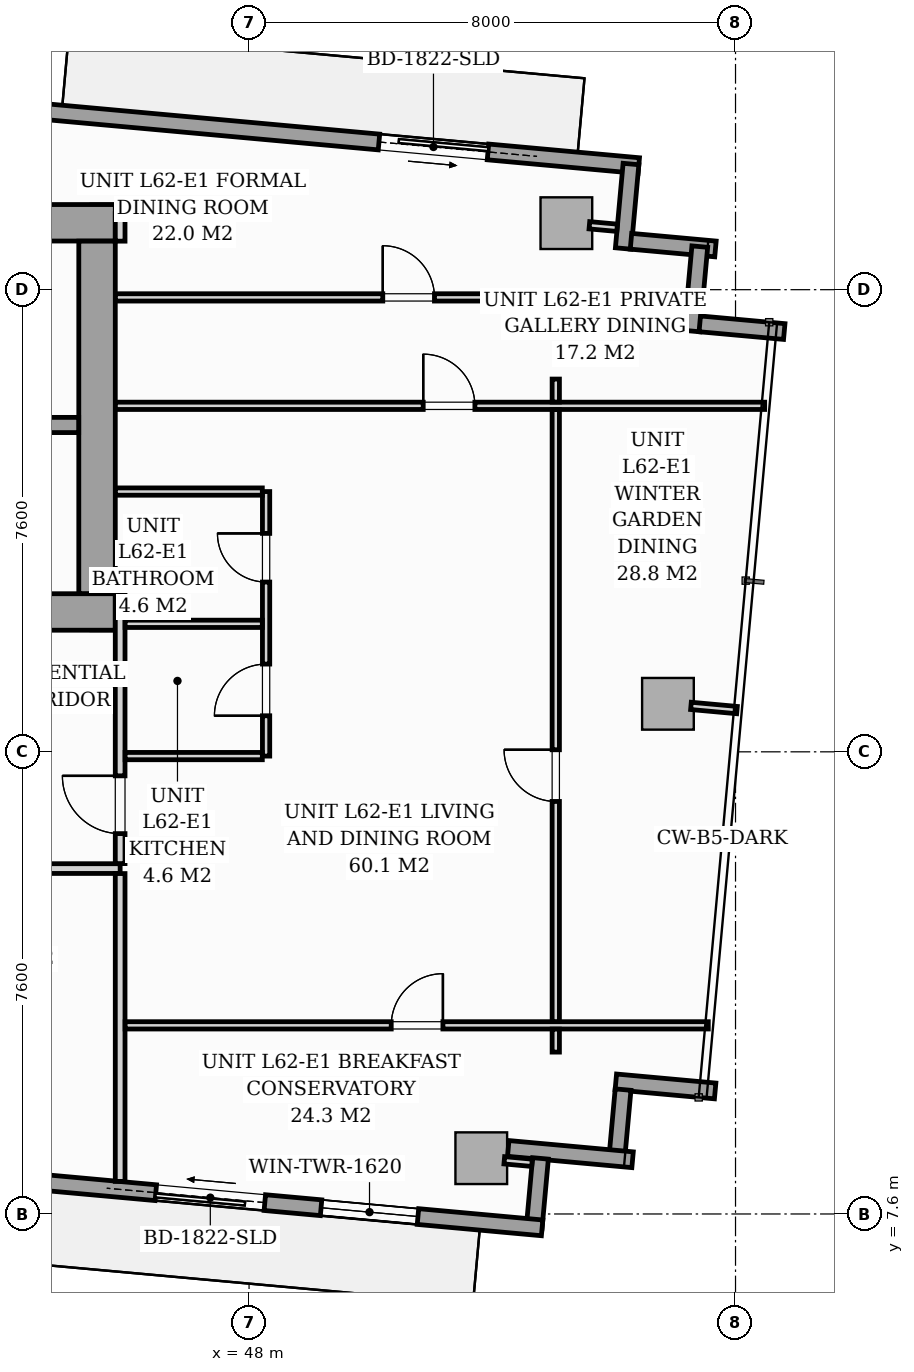
"""IFC4 building model, lengths in metres.
Left out: names, types, materials, properties, quantities, classifications, styles, units other than length and angle.
Written with IfcOpenShell. Run it as: python <this file> out.ifc"""

import sys

from ifc_helpers import new_model, si_unit, direction, frame, frame_2d, origin, origin_2d, place, context, subcontext, project, spatial, rectangle, i_section, extrude, source, transform, mapped, element, fill, save


model = new_model("IFC4")
c1 = context("Model", 3, precision=1e-05, world=origin(), true_north=direction((0.0, 1.0)))
c2 = subcontext(c1, "Body", "Model", "MODEL_VIEW")
j1 = project(units=[si_unit("LENGTHUNIT", "METRE"), si_unit("PLANEANGLEUNIT", "RADIAN")], contexts=[c1])
p1 = place(None, origin())
s1 = spatial("IfcSite", under=j1, at=p1, CompositionType="ELEMENT")
p2 = place(p1, origin())
s2 = spatial("IfcBuilding", under=s1, at=p2, CompositionType="ELEMENT")
p3 = place(p2, frame((0.0, 0.0, 216.6)))
s3 = spatial("IfcBuildingStorey", under=s2, at=p3, CompositionType="ELEMENT", Elevation=216.6)
m1 = source(origin(), c2, "Body", "SweptSolid", [
    extrude(i_section(OverallWidth=0.409, OverallDepth=0.425, WebThickness=0.033, FlangeThickness=0.052, FilletRadius=0.018, at=origin_2d()), origin(), (0.0, 0.0, 1.0), 3.296),
])
for number, where, z_axis, x_axis in (
    (1, (45.6, 17.4, 0.002), (0.0, 0.0, 1.0), (1.0, 0.0, 0.0)),
    (2, (45.6, 24.0, 0.002), (0.0, 0.0, 1.0), (1.0, 0.0, 0.0)),
):
    element("IfcColumn", number, at=place(p3, frame(where, z_axis=z_axis, x_axis=x_axis)), inside=s3, PredefinedType="PILASTER", context=c2, shape_type="MappedRepresentation", body=[
        mapped(m1, transform((0.0, 0.0, 0.0), scale=1.0)),
    ])
m2 = source(origin(), c2, "Body", "SweptSolid", [
    extrude(rectangle(XDim=0.85, YDim=0.85, at=origin_2d()), origin(), (0.0, 0.0, 1.0), 3.294),
])
for number, where, z_axis, x_axis in (
    (3, (51.819, 8.517, 0.004), (0.0, 0.0, 1.0), (0.996, -0.091, 0.0)),
    (4, (53.218, 23.894, 0.004), (0.0, 0.0, 1.0), (0.996, -0.091, 0.0)),
    (5, (54.889, 15.99, 0.004), (0.0, 0.0, 1.0), (0.996, -0.091, 0.0)),
):
    element("IfcColumn", number, at=place(p3, frame(where, z_axis=z_axis, x_axis=x_axis)), inside=s3, PredefinedType="COLUMN", context=c2, shape_type="MappedRepresentation", body=[
        mapped(m2, transform((0.0, 0.0, 0.0), scale=1.0)),
    ])
p4 = place(p3, frame((39.839, 26.166, 0.0), z_axis=(0.0, 0.0, 1.0), x_axis=(0.995884447498, -0.090632043071, 0.0)))
e6 = element("IfcWall", 6, at=p4, inside=s3, PredefinedType="STANDARD", context=c2, shape_type="SweptSolid", body=[
    extrude(rectangle(XDim=14.63, YDim=0.26, at=frame_2d((7.315, 0.0))), origin(), (0.0, 0.0, 1.0), 3.04),
])
p5 = place(p4, frame((10.34, 0.0, 0.0)))
e7 = element("IfcOpeningElement", 7, at=p5, cuts=e6, PredefinedType="OPENING", context=c2, shape_type="SweptSolid", body=[
    extrude(rectangle(XDim=1.8, YDim=2.06, at=frame_2d((0.9, 1.03))), frame((0.0, 0.14, 0.0), z_axis=(0.0, -1.0, 0.0), x_axis=(1.0, 0.0, 0.0)), (0.0, 0.0, 1.0), 0.28),
])
p6 = place(p4, frame((0.7, 0.0, 0.65)))
e8 = element("IfcOpeningElement", 8, at=p6, cuts=e6, PredefinedType="OPENING", context=c2, shape_type="SweptSolid", body=[
    extrude(rectangle(XDim=1.6, YDim=1.5, at=frame_2d((0.8, 0.75))), frame((0.0, 0.14, 0.0), z_axis=(0.0, -1.0, 0.0), x_axis=(1.0, 0.0, 0.0)), (0.0, 0.0, 1.0), 0.28),
])
p7 = place(p3, frame((54.281, 24.866, 0.0), z_axis=(0.0, 0.0, 1.0), x_axis=(-0.090661991521, -0.995881721538, 0.0)))
e9 = element("IfcWall", 9, at=p7, inside=s3, PredefinedType="STANDARD", context=c2, shape_type="SweptSolid", body=[
    extrude(rectangle(XDim=1.395, YDim=0.26, at=frame_2d((0.698, 0.0))), origin(), (0.0, 0.0, 1.0), 3.04),
])
for number, where, z_axis, x_axis in (
    (10, (54.281, 23.596, 0.0), (0.0, 0.0, 1.0), (0.996, -0.091, 0.0)),
    (11, (55.412, 23.508, 0.0), (0.0, 0.0, 1.0), (-0.091, -0.996, 0.0)),
    (12, (55.412, 22.238, 0.0), (0.0, 0.0, 1.0), (0.996, -0.091, 0.0)),
):
    element("IfcWall", number, at=place(p3, frame(where, z_axis=z_axis, x_axis=x_axis)), inside=s3, PredefinedType="STANDARD", context=c2, shape_type="SweptSolid", body=[
        extrude(rectangle(XDim=1.395, YDim=0.26, at=frame_2d((0.698, 0.0))), origin(), (0.0, 0.0, 1.0), 3.04),
    ])
p8 = place(p3, frame((55.665, 9.623, 0.0), z_axis=(0.0, 0.0, 1.0), x_axis=(-0.995880993864, 0.090669984342, 0.0)))
e13 = element("IfcWall", 13, at=p8, inside=s3, PredefinedType="STANDARD", context=c2, shape_type="SweptSolid", body=[
    extrude(rectangle(XDim=1.64, YDim=0.26, at=frame_2d((0.82, 0.0))), origin(), (0.0, 0.0, 1.0), 3.04),
])
p9 = place(p3, frame((54.151, 9.646, 0.0), z_axis=(0.0, 0.0, 1.0), x_axis=(-0.090650594353, -0.995882759035, 0.0)))
e14 = element("IfcWall", 14, at=p9, inside=s3, PredefinedType="STANDARD", context=c2, shape_type="SweptSolid", body=[
    extrude(rectangle(XDim=1.15, YDim=0.26, at=frame_2d((0.575, 0.0))), origin(), (0.0, 0.0, 1.0), 3.04),
])
p10 = place(p3, frame((54.307, 8.492, 0.0), z_axis=(0.0, 0.0, 1.0), x_axis=(-0.995886380831, 0.09061079668, 0.0)))
e15 = element("IfcWall", 15, at=p10, inside=s3, PredefinedType="STANDARD", context=c2, shape_type="SweptSolid", body=[
    extrude(rectangle(XDim=2.053, YDim=0.26, at=frame_2d((1.027, 0.0))), origin(), (0.0, 0.0, 1.0), 3.04),
])
p11 = place(p3, frame((52.792, 8.514, 0.0), z_axis=(0.0, 0.0, 1.0), x_axis=(-0.090650594353, -0.995882759035, 0.0)))
e16 = element("IfcWall", 16, at=p11, inside=s3, PredefinedType="STANDARD", context=c2, shape_type="SweptSolid", body=[
    extrude(rectangle(XDim=1.15, YDim=0.26, at=frame_2d((0.575, 0.0))), origin(), (0.0, 0.0, 1.0), 3.04),
])
p12 = place(p3, frame((52.819, 7.372, 0.0), z_axis=(0.0, 0.0, 1.0), x_axis=(-0.995884447498, 0.090632043071, 0.0)))
e17 = element("IfcWall", 17, at=p12, inside=s3, PredefinedType="STANDARD", context=c2, shape_type="SweptSolid", body=[
    extrude(rectangle(XDim=14.63, YDim=0.26, at=frame_2d((7.315, 0.0))), origin(), (0.0, 0.0, 1.0), 3.04),
])
p13 = place(p12, frame((4.579, 0.0, 0.0)))
e18 = element("IfcOpeningElement", 18, at=p13, cuts=e17, PredefinedType="OPENING", context=c2, shape_type="SweptSolid", body=[
    extrude(rectangle(XDim=1.8, YDim=2.06, at=frame_2d((0.9, 1.03))), frame((0.0, 0.14, 0.0), z_axis=(0.0, -1.0, 0.0), x_axis=(1.0, 0.0, 0.0)), (0.0, 0.0, 1.0), 0.28),
])
p14 = place(p12, frame((2.05, 0.0, 0.65)))
e19 = element("IfcOpeningElement", 19, at=p14, cuts=e17, PredefinedType="OPENING", context=c2, shape_type="SweptSolid", body=[
    extrude(rectangle(XDim=1.6, YDim=1.5, at=frame_2d((0.8, 0.75))), frame((0.0, 0.14, 0.0), z_axis=(0.0, -1.0, 0.0), x_axis=(1.0, 0.0, 0.0)), (0.0, 0.0, 1.0), 0.28),
])
p15 = place(p12, frame((9.048, 0.0, 0.75)))
e20 = element("IfcOpeningElement", 20, at=p15, cuts=e17, PredefinedType="OPENING", context=c2, shape_type="SweptSolid", body=[
    extrude(rectangle(XDim=1.6, YDim=1.5, at=frame_2d((0.8, 0.75))), frame((0.0, 0.14, 0.0), z_axis=(0.0, -1.0, 0.0), x_axis=(1.0, 0.0, 0.0)), (0.0, 0.0, 1.0), 0.28),
])
p16 = place(p3, frame((26.2, 17.5, 0.0), z_axis=(0.0, 0.0, 1.0), x_axis=(1.0, 0.0, 0.0)))
e21 = element("IfcWall", 21, at=p16, inside=s3, PredefinedType="SHEAR", context=c2, shape_type="SweptSolid", body=[
    extrude(rectangle(XDim=19.6, YDim=0.6, at=frame_2d((9.8, 0.0))), origin(), (0.0, 0.0, 1.0), 3.3),
])
p17 = place(p16, frame((0.95, 0.0, 0.0)))
e22 = element("IfcOpeningElement", 22, at=p17, cuts=e21, PredefinedType="OPENING", context=c2, shape_type="SweptSolid", body=[
    extrude(rectangle(XDim=0.95, YDim=2.06, at=frame_2d((0.475, 1.03))), frame((0.0, 0.31, 0.0), z_axis=(0.0, -1.0, 0.0), x_axis=(1.0, 0.0, 0.0)), (0.0, 0.0, 1.0), 0.62),
])
p18 = place(p16, frame((9.38, 0.0, 0.0)))
e23 = element("IfcOpeningElement", 23, at=p18, cuts=e21, PredefinedType="OPENING", context=c2, shape_type="SweptSolid", body=[
    extrude(rectangle(XDim=0.85, YDim=2.0, at=frame_2d((0.425, 1.0))), frame((0.0, 0.31, 0.0), z_axis=(0.0, -1.0, 0.0), x_axis=(1.0, 0.0, 0.0)), (0.0, 0.0, 1.0), 0.62),
])
p19 = place(p16, frame((17.55, 0.0, 0.0)))
e24 = element("IfcOpeningElement", 24, at=p19, cuts=e21, PredefinedType="OPENING", context=c2, shape_type="SweptSolid", body=[
    extrude(rectangle(XDim=0.95, YDim=2.06, at=frame_2d((0.475, 1.03))), frame((0.0, 0.31, 0.0), z_axis=(0.0, -1.0, 0.0), x_axis=(1.0, 0.0, 0.0)), (0.0, 0.0, 1.0), 0.62),
])
p20 = place(p3, frame((26.2, 23.9, 0.0), z_axis=(0.0, 0.0, 1.0), x_axis=(1.0, 0.0, 0.0)))
e25 = element("IfcWall", 25, at=p20, inside=s3, PredefinedType="SHEAR", context=c2, shape_type="SweptSolid", body=[
    extrude(rectangle(XDim=19.6, YDim=0.6, at=frame_2d((9.8, 0.0))), origin(), (0.0, 0.0, 1.0), 3.3),
])
p21 = place(p3, frame((45.5, 17.802, 0.0), z_axis=(0.0, 0.0, 1.0), x_axis=(0.0, 1.0, 0.0)))
e26 = element("IfcWall", 26, at=p21, inside=s3, PredefinedType="SHEAR", context=c2, shape_type="SweptSolid", body=[
    extrude(rectangle(XDim=5.796, YDim=0.6, at=frame_2d((2.898, 0.0))), origin(), (0.0, 0.0, 1.0), 3.3),
])
p22 = place(p3, frame((37.05, 20.575, 0.0), z_axis=(0.0, 0.0, 1.0), x_axis=(1.0, 0.0, 0.0)))
e27 = element("IfcWall", 27, at=p22, inside=s3, PredefinedType="SOLIDWALL", context=c2, shape_type="SweptSolid", body=[
    extrude(rectangle(XDim=8.148, YDim=0.25, at=frame_2d((4.074, 0.0))), origin(), (0.0, 0.0, 1.0), 3.3),
])
p23 = place(p22, frame((6.6, 0.0, 0.0)))
e28 = element("IfcOpeningElement", 28, at=p23, cuts=e27, PredefinedType="OPENING", context=c2, shape_type="SweptSolid", body=[
    extrude(rectangle(XDim=0.95, YDim=2.06, at=frame_2d((0.475, 1.03))), frame((0.0, 0.135, 0.0), z_axis=(0.0, -1.0, 0.0), x_axis=(1.0, 0.0, 0.0)), (0.0, 0.0, 1.0), 0.27),
])
p24 = place(p3, frame((26.12, 13.28, 0.0), z_axis=(0.0, 0.0, 1.0), x_axis=(1.0, 0.0, 0.0)))
e29 = element("IfcWall", 29, at=p24, inside=s3, PredefinedType="PARTITIONING", context=c2, shape_type="SweptSolid", body=[
    extrude(rectangle(XDim=19.76, YDim=0.16, at=frame_2d((9.88, 0.0))), origin(), (0.0, 0.0, 1.0), 2.55),
])
p25 = place(p24, frame((5.345, 0.0, 0.0)))
e30 = element("IfcOpeningElement", 30, at=p25, cuts=e29, PredefinedType="OPENING", context=c2, shape_type="SweptSolid", body=[
    extrude(rectangle(XDim=0.95, YDim=2.06, at=frame_2d((0.475, 1.03))), frame((0.0, 0.09, 0.0), z_axis=(0.0, -1.0, 0.0), x_axis=(1.0, 0.0, 0.0)), (0.0, 0.0, 1.0), 0.18),
])
p26 = place(p24, frame((8.612, 0.0, 0.0)))
e31 = element("IfcOpeningElement", 31, at=p26, cuts=e29, PredefinedType="OPENING", context=c2, shape_type="SweptSolid", body=[
    extrude(rectangle(XDim=0.95, YDim=2.06, at=frame_2d((0.475, 1.03))), frame((0.0, 0.09, 0.0), z_axis=(0.0, -1.0, 0.0), x_axis=(1.0, 0.0, 0.0)), (0.0, 0.0, 1.0), 0.18),
])
p27 = place(p3, frame((45.88, 8.136, 0.0), z_axis=(0.0, 0.0, 1.0), x_axis=(0.0, 1.0, 0.0)))
e32 = element("IfcWall", 32, at=p27, inside=s3, PredefinedType="PARTITIONING", context=c2, shape_type="SweptSolid", body=[
    extrude(rectangle(XDim=5.062, YDim=0.16, at=frame_2d((2.531, 0.0))), origin(), (0.0, 0.0, 1.0), 3.04),
])
p28 = place(p3, frame((45.88, 13.362, 0.0), z_axis=(0.0, 0.0, 1.0), x_axis=(0.0, 1.0, 0.0)))
e33 = element("IfcWall", 33, at=p28, inside=s3, PredefinedType="PARTITIONING", context=c2, shape_type="SweptSolid", body=[
    extrude(rectangle(XDim=4.44, YDim=0.16, at=frame_2d((2.22, 0.0))), origin(), (0.0, 0.0, 1.0), 3.04),
])
p29 = place(p28, frame((0.493, 0.0, 0.0)))
e34 = element("IfcOpeningElement", 34, at=p29, cuts=e33, PredefinedType="OPENING", context=c2, shape_type="SweptSolid", body=[
    extrude(rectangle(XDim=0.95, YDim=2.06, at=frame_2d((0.475, 1.03))), frame((0.0, 0.09, 0.0), z_axis=(0.0, -1.0, 0.0), x_axis=(1.0, 0.0, 0.0)), (0.0, 0.0, 1.0), 0.18),
])
p30 = place(p3, frame((45.88, 23.598, 0.0), z_axis=(0.0, 0.0, 1.0), x_axis=(0.0, 1.0, 0.0)))
e35 = element("IfcWall", 35, at=p30, inside=s3, PredefinedType="PARTITIONING", context=c2, shape_type="SweptSolid", body=[
    extrude(rectangle(XDim=0.452, YDim=0.16, at=frame_2d((0.226, 0.0))), origin(), (0.0, 0.0, 1.0), 3.04),
])
p31 = place(p3, frame((48.28, 15.13, 0.0), z_axis=(0.0, 0.0, 1.0), x_axis=(0.0, 1.0, 0.0)))
e36 = element("IfcWall", 36, at=p31, inside=s3, PredefinedType="PARTITIONING", context=c2, shape_type="SweptSolid", body=[
    extrude(rectangle(XDim=4.35, YDim=0.12, at=frame_2d((2.175, 0.0))), origin(), (0.0, 0.0, 1.0), 3.04),
])
p32 = place(p31, frame((0.663, 0.0, 0.0)))
e37 = element("IfcOpeningElement", 37, at=p32, cuts=e36, PredefinedType="OPENING", context=c2, shape_type="SweptSolid", body=[
    extrude(rectangle(XDim=0.85, YDim=2.05, at=frame_2d((0.425, 1.025))), frame((0.0, 0.07, 0.0), z_axis=(0.0, -1.0, 0.0), x_axis=(1.0, 0.0, 0.0)), (0.0, 0.0, 1.0), 0.14),
])
p33 = place(p31, frame((2.862, 0.0, 0.0)))
e38 = element("IfcOpeningElement", 38, at=p33, cuts=e36, PredefinedType="OPENING", context=c2, shape_type="SweptSolid", body=[
    extrude(rectangle(XDim=0.8, YDim=2.02, at=frame_2d((0.4, 1.01))), frame((0.0, 0.07, 0.0), z_axis=(0.0, -1.0, 0.0), x_axis=(1.0, 0.0, 0.0)), (0.0, 0.0, 1.0), 0.14),
])
p34 = place(p3, frame((45.962, 17.305, 0.0), z_axis=(0.0, 0.0, 1.0), x_axis=(1.0, 0.0, 0.0)))
e39 = element("IfcWall", 39, at=p34, inside=s3, PredefinedType="PARTITIONING", context=c2, shape_type="SweptSolid", body=[
    extrude(rectangle(XDim=2.256, YDim=0.12, at=frame_2d((1.128, 0.0))), origin(), (0.0, 0.0, 1.0), 2.381),
])
p35 = place(p3, frame((45.962, 15.13, 0.0), z_axis=(0.0, 0.0, 1.0), x_axis=(1.0, 0.0, 0.0)))
e40 = element("IfcWall", 40, at=p35, inside=s3, PredefinedType="PARTITIONING", context=c2, shape_type="SweptSolid", body=[
    extrude(rectangle(XDim=2.256, YDim=0.12, at=frame_2d((1.128, 0.0))), origin(), (0.0, 0.0, 1.0), 3.04),
])
p36 = place(p3, frame((45.802, 19.48, 0.0), z_axis=(0.0, 0.0, 1.0), x_axis=(1.0, 0.0, 0.0)))
e41 = element("IfcWall", 41, at=p36, inside=s3, PredefinedType="PARTITIONING", context=c2, shape_type="SweptSolid", body=[
    extrude(rectangle(XDim=2.416, YDim=0.12, at=frame_2d((1.208, 0.0))), origin(), (0.0, 0.0, 1.0), 3.04),
])
p37 = place(p3, frame((45.802, 22.673, 0.0), z_axis=(0.0, 0.0, 1.0), x_axis=(1.0, 0.0, 0.0)))
e42 = element("IfcWall", 42, at=p37, inside=s3, PredefinedType="PARTITIONING", context=c2, shape_type="SweptSolid", body=[
    extrude(rectangle(XDim=9.402, YDim=0.12, at=frame_2d((4.701, 0.0))), origin(), (0.0, 0.0, 1.0), 3.04),
])
p38 = place(p37, frame((4.397, 0.0, 0.0)))
e43 = element("IfcOpeningElement", 43, at=p38, cuts=e42, PredefinedType="OPENING", context=c2, shape_type="SweptSolid", body=[
    extrude(rectangle(XDim=0.85, YDim=2.05, at=frame_2d((0.425, 1.025))), frame((0.0, 0.07, 0.0), z_axis=(0.0, -1.0, 0.0), x_axis=(1.0, 0.0, 0.0)), (0.0, 0.0, 1.0), 0.14),
])
p39 = place(p3, frame((45.962, 10.702, 0.0), z_axis=(0.0, 0.0, 1.0), x_axis=(1.0, 0.0, 0.0)))
e44 = element("IfcWall", 44, at=p39, inside=s3, PredefinedType="PARTITIONING", context=c2, shape_type="SweptSolid", body=[
    extrude(rectangle(XDim=9.59, YDim=0.12, at=frame_2d((4.795, 0.0))), origin(), (0.0, 0.0, 1.0), 3.04),
])
p40 = place(p39, frame((4.376, 0.0, 0.0)))
e45 = element("IfcOpeningElement", 45, at=p40, cuts=e44, PredefinedType="OPENING", context=c2, shape_type="SweptSolid", body=[
    extrude(rectangle(XDim=0.85, YDim=2.05, at=frame_2d((0.425, 1.025))), frame((0.0, 0.07, 0.0), z_axis=(0.0, -1.0, 0.0), x_axis=(1.0, 0.0, 0.0)), (0.0, 0.0, 1.0), 0.14),
])
p41 = place(p3, frame((45.802, 20.89, 0.0), z_axis=(0.0, 0.0, 1.0), x_axis=(1.0, 0.0, 0.0)))
e46 = element("IfcWall", 46, at=p41, inside=s3, PredefinedType="PARTITIONING", context=c2, shape_type="SweptSolid", body=[
    extrude(rectangle(XDim=10.677, YDim=0.12, at=frame_2d((5.339, 0.0))), origin(), (0.0, 0.0, 1.0), 3.04),
])
p42 = place(p41, frame((5.062, 0.0, 0.0)))
e47 = element("IfcOpeningElement", 47, at=p42, cuts=e46, PredefinedType="OPENING", context=c2, shape_type="SweptSolid", body=[
    extrude(rectangle(XDim=0.85, YDim=2.05, at=frame_2d((0.425, 1.025))), frame((0.0, 0.07, 0.0), z_axis=(0.0, -1.0, 0.0), x_axis=(1.0, 0.0, 0.0)), (0.0, 0.0, 1.0), 0.14),
])
p43 = place(p3, frame((53.044, 10.262, 0.0), z_axis=(0.0, 0.0, 1.0), x_axis=(0.0, 1.0, 0.0)))
e48 = element("IfcWall", 48, at=p43, inside=s3, PredefinedType="PARTITIONING", context=c2, shape_type="SweptSolid", body=[
    extrude(rectangle(XDim=0.378, YDim=0.12, at=frame_2d((0.189, 0.0))), origin(), (0.0, 0.0, 1.0), 3.04),
])
p44 = place(p3, frame((53.044, 10.764, 0.0), z_axis=(0.0, 0.0, 1.0), x_axis=(0.0, 1.0, 0.0)))
e49 = element("IfcWall", 49, at=p44, inside=s3, PredefinedType="PARTITIONING", context=c2, shape_type="SweptSolid", body=[
    extrude(rectangle(XDim=10.064, YDim=0.12, at=frame_2d((5.032, 0.0))), origin(), (0.0, 0.0, 1.0), 3.04),
])
p45 = place(p44, frame((3.62, 0.0, 0.0)))
e50 = element("IfcOpeningElement", 50, at=p45, cuts=e49, PredefinedType="OPENING", context=c2, shape_type="SweptSolid", body=[
    extrude(rectangle(XDim=0.85, YDim=2.05, at=frame_2d((0.425, 1.025))), frame((0.0, 0.07, 0.0), z_axis=(0.0, -1.0, 0.0), x_axis=(1.0, 0.0, 0.0)), (0.0, 0.0, 1.0), 0.14),
])
p46 = place(p3, frame((53.044, 20.952, 0.0), z_axis=(0.0, 0.0, 1.0), x_axis=(0.0, 1.0, 0.0)))
e51 = element("IfcWall", 51, at=p46, inside=s3, PredefinedType="PARTITIONING", context=c2, shape_type="SweptSolid", body=[
    extrude(rectangle(XDim=0.378, YDim=0.12, at=frame_2d((0.189, 0.0))), origin(), (0.0, 0.0, 1.0), 3.04),
])
for number, where, z_axis, x_axis in (
    (52, (52.197, 8.483, 0.0), (0.0, 0.0, 1.0), (0.996, -0.091, 0.0)),
    (53, (53.597, 23.859, 0.0), (0.0, 0.0, 1.0), (0.996, -0.091, 0.0)),
):
    element("IfcWall", number, at=place(p3, frame(where, z_axis=z_axis, x_axis=x_axis)), inside=s3, PredefinedType="PARTITIONING", context=c2, shape_type="SweptSolid", body=[
        extrude(rectangle(XDim=0.458, YDim=0.12, at=frame_2d((0.229, 0.0))), origin(), (0.0, 0.0, 1.0), 3.04),
    ])
p47 = place(p3, frame((55.267, 15.955, 0.0), z_axis=(0.0, 0.0, 1.0), x_axis=(0.995887938321, -0.09059367697, 0.0)))
e54 = element("IfcWall", 54, at=p47, inside=s3, PredefinedType="PARTITIONING", context=c2, shape_type="SweptSolid", body=[
    extrude(rectangle(XDim=0.76, YDim=0.12, at=frame_2d((0.38, 0.0))), origin(), (0.0, 0.0, 1.0), 3.04),
])
m3 = source(origin(), c2, "Body", "SweptSolid", [
    extrude(rectangle(XDim=1.8, YDim=2.06, at=frame_2d((0.9, 1.03))), frame((0.0, 0.025, 0.0), z_axis=(0.0, -1.0, 0.0), x_axis=(1.0, 0.0, 0.0)), (0.0, 0.0, 1.0), 0.05),
])
p48 = place(p5, origin())
e55 = element("IfcDoor", 55, at=p48, inside=s3, OperationType="SLIDING_TO_RIGHT", PredefinedType="DOOR", context=c2, shape_type="MappedRepresentation", body=[
    mapped(m3, transform((0.0, 0.0, 0.0), scale=1.0)),
])
fill(e7, e55)
p49 = place(p13, origin())
e56 = element("IfcDoor", 56, at=p49, inside=s3, OperationType="SLIDING_TO_RIGHT", PredefinedType="DOOR", context=c2, shape_type="MappedRepresentation", body=[
    mapped(m3, transform((0.0, 0.0, 0.0), scale=1.0)),
])
fill(e18, e56)
m4 = source(origin(), c2, "Body", "SweptSolid", [
    extrude(rectangle(XDim=1.6, YDim=1.5, at=frame_2d((0.8, 0.75))), frame((0.0, 0.03, 0.0), z_axis=(0.0, -1.0, 0.0), x_axis=(1.0, 0.0, 0.0)), (0.0, 0.0, 1.0), 0.06),
])
p50 = place(p14, origin())
e57 = element("IfcWindow", 57, at=p50, inside=s3, PartitioningType="SINGLE_PANEL", PredefinedType="WINDOW", context=c2, shape_type="MappedRepresentation", body=[
    mapped(m4, transform((0.0, 0.0, 0.0), scale=1.0)),
])
fill(e19, e57)
m5 = source(origin(), c2, "Body", "SweptSolid", [
    extrude(rectangle(XDim=0.95, YDim=2.06, at=frame_2d((0.475, 1.03))), frame((0.0, 0.025, 0.0), z_axis=(0.0, -1.0, 0.0), x_axis=(1.0, 0.0, 0.0)), (0.0, 0.0, 1.0), 0.05),
])
p51 = place(p29, origin())
e58 = element("IfcDoor", 58, at=p51, inside=s3, OperationType="SINGLE_SWING_RIGHT", PredefinedType="DOOR", context=c2, shape_type="MappedRepresentation", body=[
    mapped(m5, transform((0.0, 0.0, 0.0), scale=1.0)),
])
fill(e34, e58)
m6 = source(origin(), c2, "Body", "SweptSolid", [
    extrude(rectangle(XDim=0.85, YDim=2.05, at=frame_2d((0.425, 1.025))), frame((0.0, 0.025, 0.0), z_axis=(0.0, -1.0, 0.0), x_axis=(1.0, 0.0, 0.0)), (0.0, 0.0, 1.0), 0.05),
])
p52 = place(p32, origin())
e59 = element("IfcDoor", 59, at=p52, inside=s3, OperationType="SINGLE_SWING_LEFT", PredefinedType="DOOR", context=c2, shape_type="MappedRepresentation", body=[
    mapped(m6, transform((0.0, 0.0, 0.0), scale=1.0)),
])
fill(e37, e59)
m7 = source(origin(), c2, "Body", "SweptSolid", [
    extrude(rectangle(XDim=0.8, YDim=2.02, at=frame_2d((0.4, 1.01))), frame((0.0, 0.025, 0.0), z_axis=(0.0, -1.0, 0.0), x_axis=(1.0, 0.0, 0.0)), (0.0, 0.0, 1.0), 0.05),
])
p53 = place(p33, origin())
e60 = element("IfcDoor", 60, at=p53, inside=s3, OperationType="SINGLE_SWING_RIGHT", PredefinedType="DOOR", context=c2, shape_type="MappedRepresentation", body=[
    mapped(m7, transform((0.0, 0.0, 0.0), scale=1.0)),
])
fill(e38, e60)
p54 = place(p38, origin())
e61 = element("IfcDoor", 61, at=p54, inside=s3, OperationType="SINGLE_SWING_LEFT", PredefinedType="DOOR", context=c2, shape_type="MappedRepresentation", body=[
    mapped(m6, transform((0.0, 0.0, 0.0), scale=1.0)),
])
fill(e43, e61)
p55 = place(p40, origin())
e62 = element("IfcDoor", 62, at=p55, inside=s3, OperationType="SINGLE_SWING_RIGHT", PredefinedType="DOOR", context=c2, shape_type="MappedRepresentation", body=[
    mapped(m6, transform((0.0, 0.0, 0.0), scale=1.0)),
])
fill(e45, e62)
p56 = place(p42, origin())
e63 = element("IfcDoor", 63, at=p56, inside=s3, OperationType="SINGLE_SWING_LEFT", PredefinedType="DOOR", context=c2, shape_type="MappedRepresentation", body=[
    mapped(m6, transform((0.0, 0.0, 0.0), scale=1.0)),
])
fill(e47, e63)
p57 = place(p45, origin())
e64 = element("IfcDoor", 64, at=p57, inside=s3, OperationType="SINGLE_SWING_RIGHT", PredefinedType="DOOR", context=c2, shape_type="MappedRepresentation", body=[
    mapped(m6, transform((0.0, 0.0, 0.0), scale=1.0)),
])
fill(e50, e64)
save(model, sys.argv[1])
